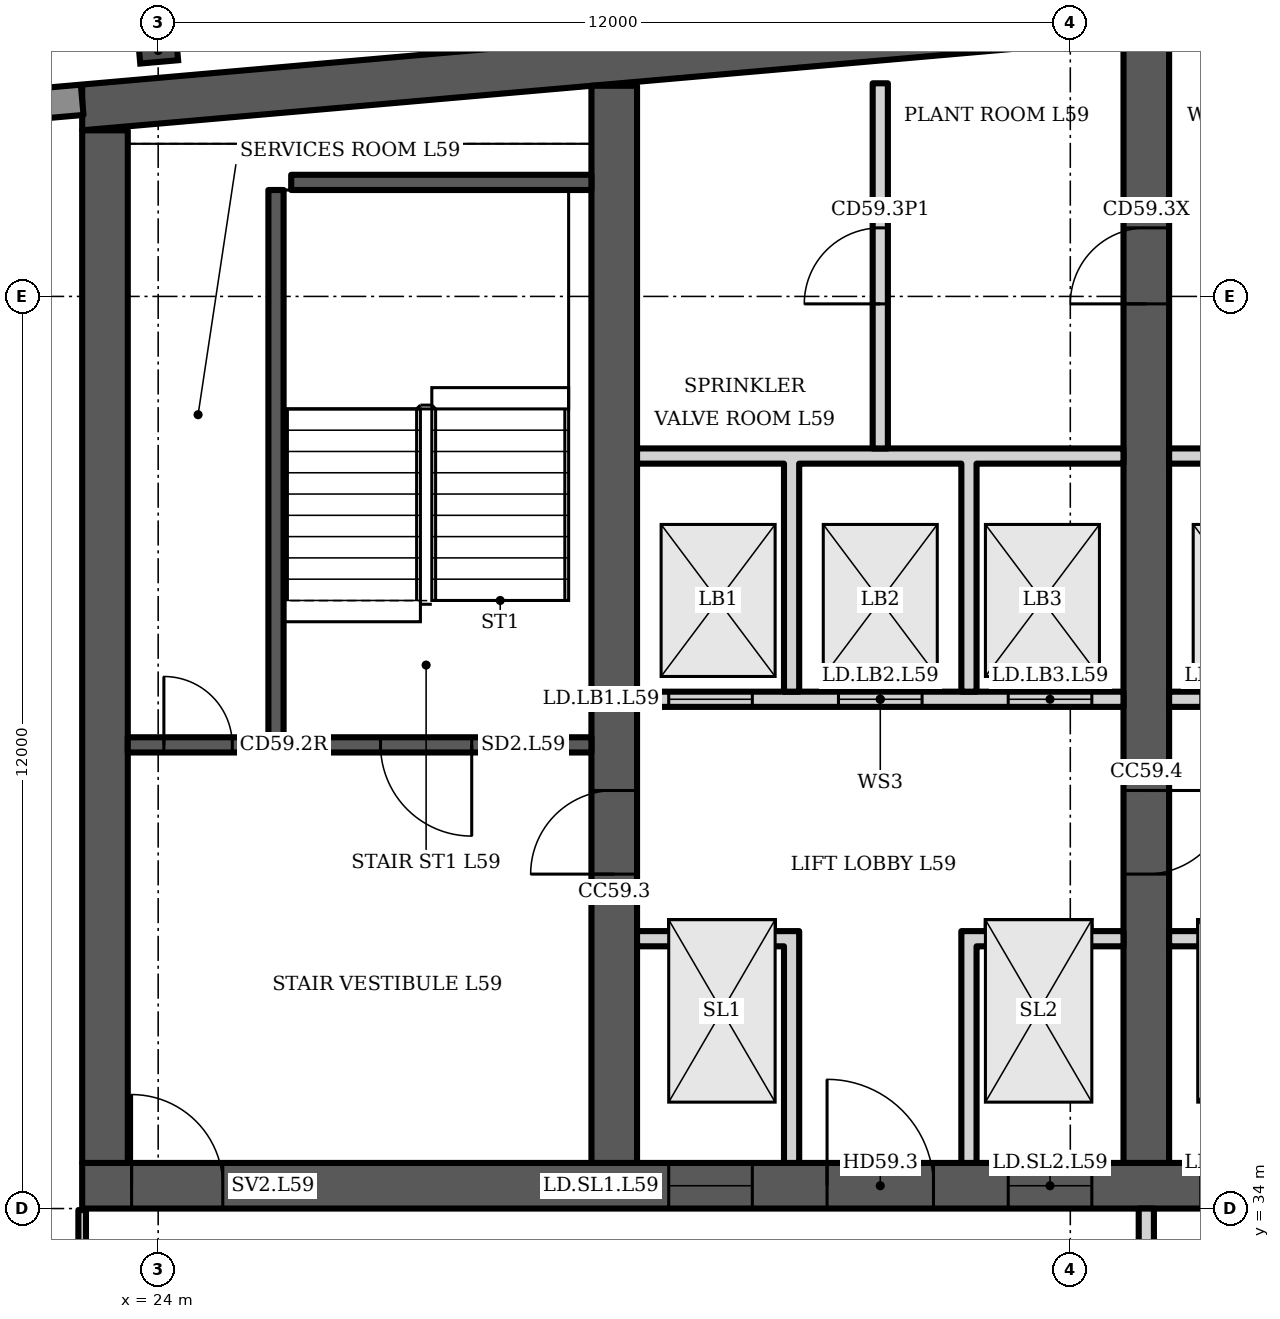
"""IFC4 building model, lengths in metres.
Left out: names, types, materials, properties, quantities, classifications, styles, units other than length and angle.
Written with IfcOpenShell. Run it as: python <this file> out.ifc"""

import sys

from ifc_helpers import new_model, si_unit, direction, frame, frame_2d, origin, origin_2d, place, context, subcontext, project, spatial, polyline, rectangle, i_section, outline, extrude, element, fill, save


model = new_model("IFC4")
c1 = context("Model", 3, precision=1e-05, world=origin(), true_north=direction((0.0, 1.0)))
c2 = subcontext(c1, "Body", "Model", "MODEL_VIEW")
j1 = project(units=[si_unit("LENGTHUNIT", "METRE"), si_unit("PLANEANGLEUNIT", "RADIAN")], contexts=[c1])
p1 = place(None, origin())
s1 = spatial("IfcSite", under=j1, at=p1, CompositionType="ELEMENT")
p2 = place(p1, origin())
s2 = spatial("IfcBuilding", under=s1, at=p2, CompositionType="ELEMENT")
p3 = place(p2, frame((0.0, 0.0, 235.9)))
s3 = spatial("IfcBuildingStorey", under=s2, at=p3, CompositionType="ELEMENT", Elevation=235.9)
p4 = place(p3, origin())
e1 = element("IfcWall", 1, at=p4, inside=s3, PredefinedType="SHEAR", context=c2, shape_type="SweptSolid", body=[
    extrude(outline(polyline([(23.0, 48.185), (40.5, 49.716), (58.0, 48.185), (58.0, 48.787), (40.5, 50.318), (23.0, 48.787), (23.0, 48.185)])), origin(), (0.0, 0.0, 1.0), 3.6),
])
p5 = place(p3, frame((23.0, 34.3, 0.0), z_axis=(0.0, 0.0, 1.0), x_axis=(1.0, 0.0, 0.0)))
e2 = element("IfcWall", 2, at=p5, inside=s3, PredefinedType="SHEAR", context=c2, shape_type="SweptSolid", body=[
    extrude(rectangle(XDim=35.0, YDim=0.6, at=frame_2d((17.5, 0.0))), origin(), (0.0, 0.0, 1.0), 3.6),
])
p6 = place(p5, frame((0.65, 0.0, 0.0)))
e3 = element("IfcOpeningElement", 3, at=p6, cuts=e2, PredefinedType="OPENING", context=c2, shape_type="SweptSolid", body=[
    extrude(rectangle(XDim=1.2, YDim=2.1, at=frame_2d((0.6, 1.05))), frame((0.0, 0.31, 0.0), z_axis=(0.0, -1.0, 0.0), x_axis=(1.0, 0.0, 0.0)), (0.0, 0.0, 1.0), 0.62),
])
p7 = place(p5, frame((7.717, 0.0, 0.0)))
e4 = element("IfcOpeningElement", 4, at=p7, cuts=e2, PredefinedType="OPENING", context=c2, shape_type="SweptSolid", body=[
    extrude(rectangle(XDim=1.1, YDim=2.1, at=frame_2d((0.55, 1.05))), frame((0.0, 0.31, 0.0), z_axis=(0.0, -1.0, 0.0), x_axis=(1.0, 0.0, 0.0)), (0.0, 0.0, 1.0), 0.62),
])
p8 = place(p5, frame((12.183, 0.0, 0.0)))
e5 = element("IfcOpeningElement", 5, at=p8, cuts=e2, PredefinedType="OPENING", context=c2, shape_type="SweptSolid", body=[
    extrude(rectangle(XDim=1.1, YDim=2.1, at=frame_2d((0.55, 1.05))), frame((0.0, 0.31, 0.0), z_axis=(0.0, -1.0, 0.0), x_axis=(1.0, 0.0, 0.0)), (0.0, 0.0, 1.0), 0.62),
])
p9 = place(p5, frame((9.8, 0.0, 0.0)))
e6 = element("IfcOpeningElement", 6, at=p9, cuts=e2, PredefinedType="OPENING", context=c2, shape_type="SweptSolid", body=[
    extrude(rectangle(XDim=1.4, YDim=2.1, at=frame_2d((0.7, 1.05))), frame((0.0, 0.31, 0.0), z_axis=(0.0, -1.0, 0.0), x_axis=(1.0, 0.0, 0.0)), (0.0, 0.0, 1.0), 0.62),
])
p10 = place(p5, frame((14.717, 0.0, 0.0)))
e7 = element("IfcOpeningElement", 7, at=p10, cuts=e2, PredefinedType="OPENING", context=c2, shape_type="SweptSolid", body=[
    extrude(rectangle(XDim=1.1, YDim=2.1, at=frame_2d((0.55, 1.05))), frame((0.0, 0.31, 0.0), z_axis=(0.0, -1.0, 0.0), x_axis=(1.0, 0.0, 0.0)), (0.0, 0.0, 1.0), 0.62),
])
p11 = place(p5, frame((16.95, 0.0, 0.0)))
e8 = element("IfcOpeningElement", 8, at=p11, cuts=e2, PredefinedType="OPENING", context=c2, shape_type="SweptSolid", body=[
    extrude(rectangle(XDim=1.1, YDim=2.1, at=frame_2d((0.55, 1.05))), frame((0.0, 0.31, 0.0), z_axis=(0.0, -1.0, 0.0), x_axis=(1.0, 0.0, 0.0)), (0.0, 0.0, 1.0), 0.62),
])
p12 = place(p5, frame((19.183, 0.0, 0.0)))
e9 = element("IfcOpeningElement", 9, at=p12, cuts=e2, PredefinedType="OPENING", context=c2, shape_type="SweptSolid", body=[
    extrude(rectangle(XDim=1.1, YDim=2.1, at=frame_2d((0.55, 1.05))), frame((0.0, 0.31, 0.0), z_axis=(0.0, -1.0, 0.0), x_axis=(1.0, 0.0, 0.0)), (0.0, 0.0, 1.0), 0.62),
])
p13 = place(p5, frame((26.15, 0.0, 0.0)))
e10 = element("IfcOpeningElement", 10, at=p13, cuts=e2, PredefinedType="OPENING", context=c2, shape_type="SweptSolid", body=[
    extrude(rectangle(XDim=1.2, YDim=2.1, at=frame_2d((0.6, 1.05))), frame((0.0, 0.31, 0.0), z_axis=(0.0, -1.0, 0.0), x_axis=(1.0, 0.0, 0.0)), (0.0, 0.0, 1.0), 0.62),
])
p14 = place(p5, frame((30.8, 0.0, 0.0)))
e11 = element("IfcOpeningElement", 11, at=p14, cuts=e2, PredefinedType="OPENING", context=c2, shape_type="SweptSolid", body=[
    extrude(rectangle(XDim=1.4, YDim=2.1, at=frame_2d((0.7, 1.05))), frame((0.0, 0.31, 0.0), z_axis=(0.0, -1.0, 0.0), x_axis=(1.0, 0.0, 0.0)), (0.0, 0.0, 1.0), 0.62),
])
p15 = place(p3, frame((23.3, 34.6, 0.0), z_axis=(0.0, 0.0, 1.0), x_axis=(0.0, 1.0, 0.0)))
e12 = element("IfcWall", 12, at=p15, inside=s3, PredefinedType="SHEAR", context=c2, shape_type="SweptSolid", body=[
    extrude(rectangle(XDim=13.585, YDim=0.6, at=frame_2d((6.792, 0.0))), origin(), (0.0, 0.0, 1.0), 3.6),
])
p16 = place(p3, frame((30.0, 34.6, 0.0), z_axis=(0.0, 0.0, 1.0), x_axis=(0.0, 1.0, 0.0)))
e13 = element("IfcWall", 13, at=p16, inside=s3, PredefinedType="SHEAR", context=c2, shape_type="SweptSolid", body=[
    extrude(rectangle(XDim=14.171, YDim=0.6, at=frame_2d((7.085, 0.0))), origin(), (0.0, 0.0, 1.0), 3.6),
])
p17 = place(p16, frame((3.8, 0.0, 0.0)))
e14 = element("IfcOpeningElement", 14, at=p17, cuts=e13, PredefinedType="OPENING", context=c2, shape_type="SweptSolid", body=[
    extrude(rectangle(XDim=1.1, YDim=2.1, at=frame_2d((0.55, 1.05))), frame((0.0, 0.31, 0.0), z_axis=(0.0, -1.0, 0.0), x_axis=(1.0, 0.0, 0.0)), (0.0, 0.0, 1.0), 0.62),
])
p18 = place(p3, frame((37.0, 34.6, 0.0), z_axis=(0.0, 0.0, 1.0), x_axis=(0.0, 1.0, 0.0)))
e15 = element("IfcWall", 15, at=p18, inside=s3, PredefinedType="SHEAR", context=c2, shape_type="SweptSolid", body=[
    extrude(rectangle(XDim=14.784, YDim=0.6, at=frame_2d((7.392, 0.0))), origin(), (0.0, 0.0, 1.0), 3.6),
])
p19 = place(p18, frame((11.302, 0.0, 0.0)))
e16 = element("IfcOpeningElement", 16, at=p19, cuts=e15, PredefinedType="OPENING", context=c2, shape_type="SweptSolid", body=[
    extrude(rectangle(XDim=1.0, YDim=2.1, at=frame_2d((0.5, 1.05))), frame((0.0, 0.31, 0.0), z_axis=(0.0, -1.0, 0.0), x_axis=(1.0, 0.0, 0.0)), (0.0, 0.0, 1.0), 0.62),
])
p20 = place(p18, frame((3.8, 0.0, 0.0)))
e17 = element("IfcOpeningElement", 17, at=p20, cuts=e15, PredefinedType="OPENING", context=c2, shape_type="SweptSolid", body=[
    extrude(rectangle(XDim=1.1, YDim=2.1, at=frame_2d((0.55, 1.05))), frame((0.0, 0.31, 0.0), z_axis=(0.0, -1.0, 0.0), x_axis=(1.0, 0.0, 0.0)), (0.0, 0.0, 1.0), 0.62),
])
p21 = place(p3, frame((24.0, 49.235, 0.0), z_axis=(0.0, 0.0, 1.0), x_axis=(-0.087156, 0.996197, 0.0)))
e18 = element("IfcColumn", 18, at=p21, inside=s3, PredefinedType="COLUMN", context=c2, shape_type="SweptSolid", body=[
    extrude(i_section(OverallWidth=0.3, OverallDepth=0.5, WebThickness=0.014, FlangeThickness=0.028, FilletRadius=0.027, at=origin_2d()), origin(), (0.0, 0.0, 1.0), 3.6),
])
p22 = place(p3, frame((23.0, 48.587, 0.0), z_axis=(0.0, 0.0, 1.0), x_axis=(-0.996194, -0.087168, 0.0)))
e19 = element("IfcWall", 19, at=p22, inside=s3, PredefinedType="SOLIDWALL", context=c2, shape_type="SweptSolid", body=[
    extrude(rectangle(XDim=2.994, YDim=0.4, at=frame_2d((1.497, 0.0))), origin(), (0.0, 0.0, 1.0), 3.2),
])
p23 = place(p3, frame((23.6, 40.1, 0.0), z_axis=(0.0, 0.0, 1.0), x_axis=(1.0, 0.0, 0.0)))
e20 = element("IfcWall", 20, at=p23, inside=s3, PredefinedType="SHEAR", context=c2, shape_type="SweptSolid", body=[
    extrude(rectangle(XDim=6.1, YDim=0.2, at=frame_2d((3.05, 0.0))), origin(), (0.0, 0.0, 1.0), 3.2),
])
p24 = place(p23, frame((3.325, 0.0, 0.0)))
e21 = element("IfcOpeningElement", 21, at=p24, cuts=e20, PredefinedType="OPENING", context=c2, shape_type="SweptSolid", body=[
    extrude(rectangle(XDim=1.2, YDim=2.1, at=frame_2d((0.6, 1.05))), frame((0.0, 0.11, 0.0), z_axis=(0.0, -1.0, 0.0), x_axis=(1.0, 0.0, 0.0)), (0.0, 0.0, 1.0), 0.22),
])
p25 = place(p23, frame((0.475, 0.0, 0.0)))
e22 = element("IfcOpeningElement", 22, at=p25, cuts=e20, PredefinedType="OPENING", context=c2, shape_type="SweptSolid", body=[
    extrude(rectangle(XDim=0.9, YDim=2.1, at=frame_2d((0.45, 1.05))), frame((0.0, 0.11, 0.0), z_axis=(0.0, -1.0, 0.0), x_axis=(1.0, 0.0, 0.0)), (0.0, 0.0, 1.0), 0.22),
])
p26 = place(p3, frame((25.55, 40.2, 0.0), z_axis=(0.0, 0.0, 1.0), x_axis=(0.0, 1.0, 0.0)))
e23 = element("IfcWall", 23, at=p26, inside=s3, PredefinedType="SHEAR", context=c2, shape_type="SweptSolid", body=[
    extrude(rectangle(XDim=7.2, YDim=0.2, at=frame_2d((3.6, 0.0))), origin(), (0.0, 0.0, 1.0), 3.2),
])
p27 = place(p3, frame((25.75, 47.5, 0.0), z_axis=(0.0, 0.0, 1.0), x_axis=(1.0, 0.0, 0.0)))
e24 = element("IfcWall", 24, at=p27, inside=s3, PredefinedType="SHEAR", context=c2, shape_type="SweptSolid", body=[
    extrude(rectangle(XDim=3.95, YDim=0.2, at=frame_2d((1.975, 0.0))), origin(), (0.0, 0.0, 1.0), 3.2),
])
p28 = place(p3, frame((30.3, 40.7, 0.0), z_axis=(0.0, 0.0, 1.0), x_axis=(1.0, 0.0, 0.0)))
e25 = element("IfcWall", 25, at=p28, inside=s3, PredefinedType="PARTITIONING", context=c2, shape_type="SweptSolid", body=[
    extrude(rectangle(XDim=6.4, YDim=0.2, at=frame_2d((3.2, 0.0))), origin(), (0.0, 0.0, 1.0), 3.2),
])
p29 = place(p28, frame((0.417, 0.0, 0.0)))
e26 = element("IfcOpeningElement", 26, at=p29, cuts=e25, PredefinedType="OPENING", context=c2, shape_type="SweptSolid", body=[
    extrude(rectangle(XDim=1.1, YDim=2.1, at=frame_2d((0.55, 1.05))), frame((0.0, 0.11, 0.0), z_axis=(0.0, -1.0, 0.0), x_axis=(1.0, 0.0, 0.0)), (0.0, 0.0, 1.0), 0.22),
])
p30 = place(p28, frame((2.65, 0.0, 0.0)))
e27 = element("IfcOpeningElement", 27, at=p30, cuts=e25, PredefinedType="OPENING", context=c2, shape_type="SweptSolid", body=[
    extrude(rectangle(XDim=1.1, YDim=2.1, at=frame_2d((0.55, 1.05))), frame((0.0, 0.11, 0.0), z_axis=(0.0, -1.0, 0.0), x_axis=(1.0, 0.0, 0.0)), (0.0, 0.0, 1.0), 0.22),
])
p31 = place(p28, frame((4.883, 0.0, 0.0)))
e28 = element("IfcOpeningElement", 28, at=p31, cuts=e25, PredefinedType="OPENING", context=c2, shape_type="SweptSolid", body=[
    extrude(rectangle(XDim=1.1, YDim=2.1, at=frame_2d((0.55, 1.05))), frame((0.0, 0.11, 0.0), z_axis=(0.0, -1.0, 0.0), x_axis=(1.0, 0.0, 0.0)), (0.0, 0.0, 1.0), 0.22),
])
p32 = place(p3, origin())
e29 = element("IfcWall", 29, at=p32, inside=s3, PredefinedType="PARTITIONING", context=c2, shape_type="SweptSolid", body=[
    extrude(outline(polyline([(32.233, 37.45), (30.3, 37.45), (30.3, 37.65), (32.233, 37.65), (32.433, 37.65), (32.433, 34.6), (32.233, 34.6), (32.233, 37.45)])), origin(), (0.0, 0.0, 1.0), 3.2),
])
p33 = place(p3, origin())
e30 = element("IfcWall", 30, at=p33, inside=s3, PredefinedType="PARTITIONING", context=c2, shape_type="SweptSolid", body=[
    extrude(outline(polyline([(34.567, 37.65), (34.767, 37.65), (36.7, 37.65), (36.7, 37.45), (34.767, 37.45), (34.767, 34.6), (34.567, 34.6), (34.567, 37.65)])), origin(), (0.0, 0.0, 1.0), 3.2),
])
p34 = place(p3, origin())
e31 = element("IfcWall", 31, at=p34, inside=s3, PredefinedType="PARTITIONING", context=c2, shape_type="SweptSolid", body=[
    extrude(outline(polyline([(32.433, 40.8), (32.233, 40.8), (32.233, 43.8), (30.3, 43.8), (30.3, 44.0), (36.7, 44.0), (36.7, 43.8), (34.767, 43.8), (34.767, 40.8), (34.567, 40.8), (34.567, 43.8), (32.433, 43.8), (32.433, 40.8)])), origin(), (0.0, 0.0, 1.0), 3.2),
])
p35 = place(p3, frame((33.5, 44.0, 0.0), z_axis=(0.0, 0.0, 1.0), x_axis=(0.0, 1.0, 0.0)))
e32 = element("IfcWall", 32, at=p35, inside=s3, PredefinedType="PARTITIONING", context=c2, shape_type="SweptSolid", body=[
    extrude(rectangle(XDim=4.804, YDim=0.2, at=frame_2d((2.402, 0.0))), origin(), (0.0, 0.0, 1.0), 3.2),
])
p36 = place(p35, frame((1.902, 0.0, 0.0)))
e33 = element("IfcOpeningElement", 33, at=p36, cuts=e32, PredefinedType="OPENING", context=c2, shape_type="SweptSolid", body=[
    extrude(rectangle(XDim=1.0, YDim=2.1, at=frame_2d((0.5, 1.05))), frame((0.0, 0.11, 0.0), z_axis=(0.0, -1.0, 0.0), x_axis=(1.0, 0.0, 0.0)), (0.0, 0.0, 1.0), 0.22),
])
p37 = place(p3, frame((37.3, 40.7, 0.0), z_axis=(0.0, 0.0, 1.0), x_axis=(1.0, 0.0, 0.0)))
e34 = element("IfcWall", 34, at=p37, inside=s3, PredefinedType="PARTITIONING", context=c2, shape_type="SweptSolid", body=[
    extrude(rectangle(XDim=6.4, YDim=0.2, at=frame_2d((3.2, 0.0))), origin(), (0.0, 0.0, 1.0), 3.2),
])
p38 = place(p37, frame((0.417, 0.0, 0.0)))
e35 = element("IfcOpeningElement", 35, at=p38, cuts=e34, PredefinedType="OPENING", context=c2, shape_type="SweptSolid", body=[
    extrude(rectangle(XDim=1.1, YDim=2.1, at=frame_2d((0.55, 1.05))), frame((0.0, 0.11, 0.0), z_axis=(0.0, -1.0, 0.0), x_axis=(1.0, 0.0, 0.0)), (0.0, 0.0, 1.0), 0.22),
])
p39 = place(p37, frame((2.65, 0.0, 0.0)))
e36 = element("IfcOpeningElement", 36, at=p39, cuts=e34, PredefinedType="OPENING", context=c2, shape_type="SweptSolid", body=[
    extrude(rectangle(XDim=1.1, YDim=2.1, at=frame_2d((0.55, 1.05))), frame((0.0, 0.11, 0.0), z_axis=(0.0, -1.0, 0.0), x_axis=(1.0, 0.0, 0.0)), (0.0, 0.0, 1.0), 0.22),
])
p40 = place(p37, frame((4.883, 0.0, 0.0)))
e37 = element("IfcOpeningElement", 37, at=p40, cuts=e34, PredefinedType="OPENING", context=c2, shape_type="SweptSolid", body=[
    extrude(rectangle(XDim=1.1, YDim=2.1, at=frame_2d((0.55, 1.05))), frame((0.0, 0.11, 0.0), z_axis=(0.0, -1.0, 0.0), x_axis=(1.0, 0.0, 0.0)), (0.0, 0.0, 1.0), 0.22),
])
p41 = place(p3, origin())
e38 = element("IfcWall", 38, at=p41, inside=s3, PredefinedType="PARTITIONING", context=c2, shape_type="SweptSolid", body=[
    extrude(outline(polyline([(41.567, 37.1), (39.433, 37.1), (39.433, 34.6), (39.233, 34.6), (39.233, 37.45), (37.3, 37.45), (37.3, 37.65), (39.233, 37.65), (39.433, 37.65), (39.433, 37.3), (41.567, 37.3), (41.567, 37.35), (41.767, 37.35), (43.7, 37.35), (43.7, 37.15), (41.767, 37.15), (41.767, 34.6), (41.567, 34.6), (41.567, 37.1)])), origin(), (0.0, 0.0, 1.0), 3.2),
])
p42 = place(p3, origin())
e39 = element("IfcWall", 39, at=p42, inside=s3, PredefinedType="PARTITIONING", context=c2, shape_type="SweptSolid", body=[
    extrude(outline(polyline([(39.433, 40.8), (39.233, 40.8), (39.233, 43.8), (37.3, 43.8), (37.3, 44.0), (43.7, 44.0), (43.7, 43.8), (41.767, 43.8), (41.767, 40.8), (41.567, 40.8), (41.567, 43.8), (39.433, 43.8), (39.433, 40.8)])), origin(), (0.0, 0.0, 1.0), 3.2),
])
p43 = place(p3, frame((37.0, 30.5, 0.0), z_axis=(0.0, 0.0, 1.0), x_axis=(0.0, 1.0, 0.0)))
e40 = element("IfcWall", 40, at=p43, inside=s3, PredefinedType="PARTITIONING", context=c2, shape_type="SweptSolid", body=[
    extrude(rectangle(XDim=3.5, YDim=0.2, at=frame_2d((1.75, 0.0))), origin(), (0.0, 0.0, 1.0), 3.2),
])
p44 = place(p43, frame((1.2, 0.0, 0.0)))
e41 = element("IfcOpeningElement", 41, at=p44, cuts=e40, PredefinedType="OPENING", context=c2, shape_type="SweptSolid", body=[
    extrude(rectangle(XDim=1.1, YDim=2.1, at=frame_2d((0.55, 1.05))), frame((0.0, 0.11, 0.0), z_axis=(0.0, -1.0, 0.0), x_axis=(1.0, 0.0, 0.0)), (0.0, 0.0, 1.0), 0.22),
])
p45 = place(p3, frame((23.0, 24.275, 0.0), z_axis=(0.0, 0.0, 1.0), x_axis=(0.0, 1.0, 0.0)))
e42 = element("IfcWall", 42, at=p45, inside=s3, PredefinedType="PARTITIONING", context=c2, shape_type="SweptSolid", body=[
    extrude(rectangle(XDim=9.705, YDim=0.1, at=frame_2d((4.853, 0.0))), origin(), (0.0, 0.0, 1.0), 3.2),
])
p46 = place(p45, frame((7.905, 0.0, 0.0)))
e43 = element("IfcOpeningElement", 43, at=p46, cuts=e42, PredefinedType="OPENING", context=c2, shape_type="SweptSolid", body=[
    extrude(rectangle(XDim=1.0, YDim=2.1, at=frame_2d((0.5, 1.05))), frame((0.0, 0.06, 0.0), z_axis=(0.0, -1.0, 0.0), x_axis=(1.0, 0.0, 0.0)), (0.0, 0.0, 1.0), 0.12),
])
p47 = place(p24, origin())
e44 = element("IfcDoor", 44, at=p47, inside=s3, OperationType="SINGLE_SWING_RIGHT", PredefinedType="DOOR", context=c2, shape_type="SweptSolid", body=[
    extrude(rectangle(XDim=1.2, YDim=2.1, at=frame_2d((0.6, 1.05))), frame((0.0, 0.025, 0.0), z_axis=(0.0, -1.0, 0.0), x_axis=(1.0, 0.0, 0.0)), (0.0, 0.0, 1.0), 0.05),
])
fill(e21, e44)
p48 = place(p25, origin())
e45 = element("IfcDoor", 45, at=p48, inside=s3, OperationType="SINGLE_SWING_LEFT", PredefinedType="DOOR", context=c2, shape_type="SweptSolid", body=[
    extrude(rectangle(XDim=0.9, YDim=2.1, at=frame_2d((0.45, 1.05))), frame((0.0, 0.025, 0.0), z_axis=(0.0, -1.0, 0.0), x_axis=(1.0, 0.0, 0.0)), (0.0, 0.0, 1.0), 0.05),
])
fill(e22, e45)
p49 = place(p6, origin())
e46 = element("IfcDoor", 46, at=p49, inside=s3, OperationType="SINGLE_SWING_LEFT", PredefinedType="DOOR", context=c2, shape_type="SweptSolid", body=[
    extrude(rectangle(XDim=1.2, YDim=2.1, at=frame_2d((0.6, 1.05))), frame((0.0, 0.025, 0.0), z_axis=(0.0, -1.0, 0.0), x_axis=(1.0, 0.0, 0.0)), (0.0, 0.0, 1.0), 0.05),
])
fill(e3, e46)
p50 = place(p7, origin())
e47 = element("IfcDoor", 47, at=p50, inside=s3, OperationType="DOUBLE_DOOR_SLIDING", PredefinedType="DOOR", context=c2, shape_type="SweptSolid", body=[
    extrude(rectangle(XDim=1.1, YDim=2.1, at=frame_2d((0.55, 1.05))), frame((0.0, 0.025, 0.0), z_axis=(0.0, -1.0, 0.0), x_axis=(1.0, 0.0, 0.0)), (0.0, 0.0, 1.0), 0.05),
])
fill(e4, e47)
p51 = place(p8, origin())
e48 = element("IfcDoor", 48, at=p51, inside=s3, OperationType="DOUBLE_DOOR_SLIDING", PredefinedType="DOOR", context=c2, shape_type="SweptSolid", body=[
    extrude(rectangle(XDim=1.1, YDim=2.1, at=frame_2d((0.55, 1.05))), frame((0.0, 0.025, 0.0), z_axis=(0.0, -1.0, 0.0), x_axis=(1.0, 0.0, 0.0)), (0.0, 0.0, 1.0), 0.05),
])
fill(e5, e48)
p52 = place(p9, origin())
e49 = element("IfcDoor", 49, at=p52, inside=s3, OperationType="DOUBLE_DOOR_SINGLE_SWING", PredefinedType="DOOR", context=c2, shape_type="SweptSolid", body=[
    extrude(rectangle(XDim=1.4, YDim=2.1, at=frame_2d((0.7, 1.05))), frame((0.0, 0.025, 0.0), z_axis=(0.0, -1.0, 0.0), x_axis=(1.0, 0.0, 0.0)), (0.0, 0.0, 1.0), 0.05),
])
fill(e6, e49)
p53 = place(p29, origin())
e50 = element("IfcDoor", 50, at=p53, inside=s3, OperationType="DOUBLE_DOOR_SLIDING", PredefinedType="DOOR", context=c2, shape_type="SweptSolid", body=[
    extrude(rectangle(XDim=1.1, YDim=2.1, at=frame_2d((0.55, 1.05))), frame((0.0, 0.025, 0.0), z_axis=(0.0, -1.0, 0.0), x_axis=(1.0, 0.0, 0.0)), (0.0, 0.0, 1.0), 0.05),
])
fill(e26, e50)
p54 = place(p30, origin())
e51 = element("IfcDoor", 51, at=p54, inside=s3, OperationType="DOUBLE_DOOR_SLIDING", PredefinedType="DOOR", context=c2, shape_type="SweptSolid", body=[
    extrude(rectangle(XDim=1.1, YDim=2.1, at=frame_2d((0.55, 1.05))), frame((0.0, 0.025, 0.0), z_axis=(0.0, -1.0, 0.0), x_axis=(1.0, 0.0, 0.0)), (0.0, 0.0, 1.0), 0.05),
])
fill(e27, e51)
p55 = place(p31, origin())
e52 = element("IfcDoor", 52, at=p55, inside=s3, OperationType="DOUBLE_DOOR_SLIDING", PredefinedType="DOOR", context=c2, shape_type="SweptSolid", body=[
    extrude(rectangle(XDim=1.1, YDim=2.1, at=frame_2d((0.55, 1.05))), frame((0.0, 0.025, 0.0), z_axis=(0.0, -1.0, 0.0), x_axis=(1.0, 0.0, 0.0)), (0.0, 0.0, 1.0), 0.05),
])
fill(e28, e52)
p56 = place(p36, origin())
e53 = element("IfcDoor", 53, at=p56, inside=s3, OperationType="SINGLE_SWING_LEFT", PredefinedType="DOOR", context=c2, shape_type="SweptSolid", body=[
    extrude(rectangle(XDim=1.0, YDim=2.1, at=frame_2d((0.5, 1.05))), frame((0.0, 0.025, 0.0), z_axis=(0.0, -1.0, 0.0), x_axis=(1.0, 0.0, 0.0)), (0.0, 0.0, 1.0), 0.05),
])
fill(e33, e53)
p57 = place(p19, origin())
e54 = element("IfcDoor", 54, at=p57, inside=s3, OperationType="SINGLE_SWING_LEFT", PredefinedType="DOOR", context=c2, shape_type="SweptSolid", body=[
    extrude(rectangle(XDim=1.0, YDim=2.1, at=frame_2d((0.5, 1.05))), frame((0.0, 0.025, 0.0), z_axis=(0.0, -1.0, 0.0), x_axis=(1.0, 0.0, 0.0)), (0.0, 0.0, 1.0), 0.05),
])
fill(e16, e54)
p58 = place(p17, origin())
e55 = element("IfcDoor", 55, at=p58, inside=s3, OperationType="SINGLE_SWING_LEFT", PredefinedType="DOOR", context=c2, shape_type="SweptSolid", body=[
    extrude(rectangle(XDim=1.1, YDim=2.1, at=frame_2d((0.55, 1.05))), frame((0.0, 0.025, 0.0), z_axis=(0.0, -1.0, 0.0), x_axis=(1.0, 0.0, 0.0)), (0.0, 0.0, 1.0), 0.05),
])
fill(e14, e55)
p59 = place(p20, origin())
e56 = element("IfcDoor", 56, at=p59, inside=s3, OperationType="SINGLE_SWING_RIGHT", PredefinedType="DOOR", context=c2, shape_type="SweptSolid", body=[
    extrude(rectangle(XDim=1.1, YDim=2.1, at=frame_2d((0.55, 1.05))), frame((0.0, 0.025, 0.0), z_axis=(0.0, -1.0, 0.0), x_axis=(1.0, 0.0, 0.0)), (0.0, 0.0, 1.0), 0.05),
])
fill(e17, e56)
save(model, sys.argv[1])
